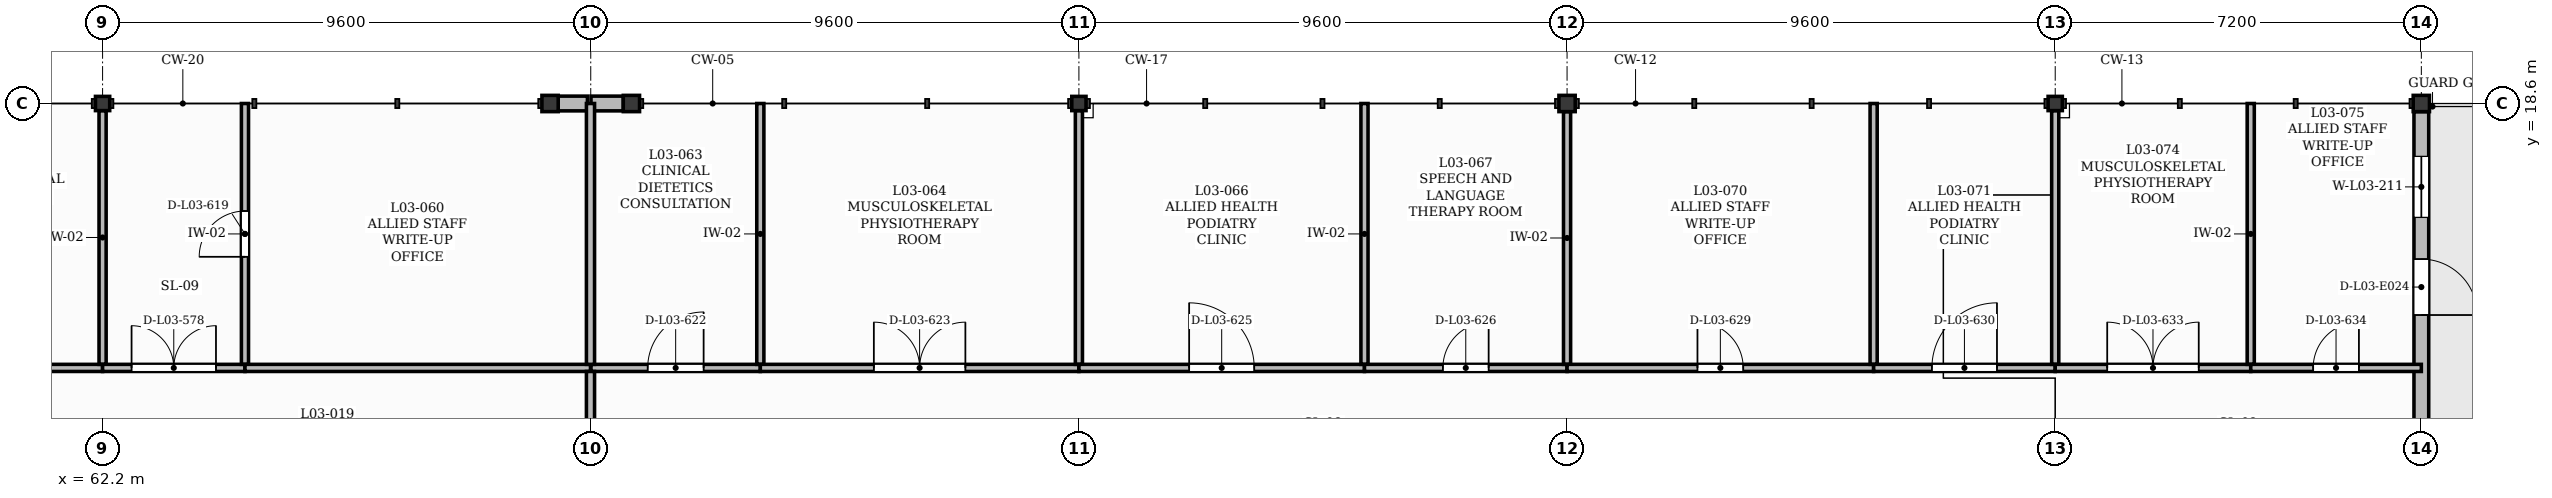
"""IFC4 building model, lengths in metres.
Left out: names, types, materials, properties, quantities, classifications, styles, units other than length and angle.
Written with IfcOpenShell. Run it as: python <this file> out.ifc"""

import sys

from ifc_helpers import new_model, si_unit, direction, frame, frame_2d, origin, origin_2d, place, context, subcontext, project, spatial, rectangle, extrude, element, fill, save


model = new_model("IFC4")
c1 = context("Model", 3, precision=1e-05, world=origin(), true_north=direction((0.0, 1.0)))
c2 = subcontext(c1, "Body", "Model", "MODEL_VIEW")
j1 = project(units=[si_unit("LENGTHUNIT", "METRE"), si_unit("PLANEANGLEUNIT", "RADIAN")], contexts=[c1])
p1 = place(None, origin())
s1 = spatial("IfcSite", under=j1, at=p1, CompositionType="ELEMENT")
p2 = place(p1, origin())
s2 = spatial("IfcBuilding", under=s1, at=p2, CompositionType="ELEMENT")
p3 = place(p2, frame((0.0, 0.0, 13.2)))
s3 = spatial("IfcBuildingStorey", under=s2, at=p3, CompositionType="ELEMENT", Elevation=13.2)
p4 = place(p3, frame((72.6, 18.6, 0.0), z_axis=(0.0, 0.0, 1.0), x_axis=(1.0, 0.0, 0.0)))
e1 = element("IfcColumn", 1, at=p4, inside=s3, PredefinedType="COLUMN", context=c2, shape_type="SweptSolid", body=[
    extrude(rectangle(XDim=0.32, YDim=0.32, at=origin_2d()), origin(), (0.0, 0.0, 1.0), 8.109),
])
p5 = place(p3, frame((81.4, 18.6, 0.0), z_axis=(0.0, 0.0, 1.0), x_axis=(1.0, 0.0, 0.0)))
e2 = element("IfcColumn", 2, at=p5, inside=s3, PredefinedType="COLUMN", context=c2, shape_type="SweptSolid", body=[
    extrude(rectangle(XDim=0.28, YDim=0.28, at=origin_2d()), origin(), (0.0, 0.0, 1.0), 8.109),
])
p6 = place(p3, frame((91.0, 18.6, 0.0), z_axis=(0.0, 0.0, 1.0), x_axis=(1.0, 0.0, 0.0)))
e3 = element("IfcColumn", 3, at=p6, inside=s3, PredefinedType="COLUMN", context=c2, shape_type="SweptSolid", body=[
    extrude(rectangle(XDim=0.32, YDim=0.32, at=origin_2d()), origin(), (0.0, 0.0, 1.0), 8.109),
])
p7 = place(p3, frame((100.6, 18.6, 0.0), z_axis=(0.0, 0.0, 1.0), x_axis=(1.0, 0.0, 0.0)))
e4 = element("IfcColumn", 4, at=p7, inside=s3, PredefinedType="COLUMN", context=c2, shape_type="SweptSolid", body=[
    extrude(rectangle(XDim=0.28, YDim=0.28, at=origin_2d()), origin(), (0.0, 0.0, 1.0), 8.109),
])
p8 = place(p3, frame((107.8, 18.6, 0.0), z_axis=(0.0, 0.0, 1.0), x_axis=(1.0, 0.0, 0.0)))
e5 = element("IfcColumn", 5, at=p8, inside=s3, PredefinedType="COLUMN", context=c2, shape_type="SweptSolid", body=[
    extrude(rectangle(XDim=0.32, YDim=0.32, at=origin_2d()), origin(), (0.0, 0.0, 1.0), 8.109),
])
p9 = place(p3, frame((62.2, 18.6, 0.0), z_axis=(0.0, 0.0, 1.0), x_axis=(1.0, 0.0, 0.0)))
e6 = element("IfcColumn", 6, at=p9, inside=s3, PredefinedType="COLUMN", context=c2, shape_type="SweptSolid", body=[
    extrude(rectangle(XDim=0.28, YDim=0.28, at=origin_2d()), origin(), (0.0, 0.0, 1.0), 8.109),
])
p10 = place(p3, frame((71.0, 18.6, 0.0), z_axis=(0.0, 0.0, 1.0), x_axis=(1.0, 0.0, 0.0)))
e7 = element("IfcColumn", 7, at=p10, inside=s3, PredefinedType="COLUMN", context=c2, shape_type="SweptSolid", body=[
    extrude(rectangle(XDim=0.32, YDim=0.32, at=origin_2d()), origin(), (0.0, 0.0, 1.0), 8.109),
])
p11 = place(p3, frame((71.16, 18.6, 0.0), z_axis=(0.0, 0.0, 1.0), x_axis=(1.0, 0.0, 0.0)))
e8 = element("IfcWall", 8, at=p11, inside=s3, PredefinedType="SOLIDWALL", context=c2, shape_type="SweptSolid", body=[
    extrude(rectangle(XDim=0.575, YDim=0.29, at=frame_2d((0.288, 0.0))), origin(), (0.0, 0.0, 1.0), 4.0),
])
p12 = place(p3, frame((71.805, 18.6, 0.0), z_axis=(0.0, 0.0, 1.0), x_axis=(1.0, 0.0, 0.0)))
e9 = element("IfcWall", 9, at=p12, inside=s3, PredefinedType="SOLIDWALL", context=c2, shape_type="SweptSolid", body=[
    extrude(rectangle(XDim=0.635, YDim=0.29, at=frame_2d((0.317, 0.0))), origin(), (0.0, 0.0, 1.0), 4.0),
])
p13 = place(p3, frame((107.8, 11.54, 0.0), z_axis=(0.0, 0.0, 1.0), x_axis=(0.0, 1.0, 0.0)))
e10 = element("IfcWall", 10, at=p13, inside=s3, PredefinedType="SOLIDWALL", context=c2, shape_type="SweptSolid", body=[
    extrude(rectangle(XDim=6.9, YDim=0.29, at=frame_2d((3.45, 0.0))), origin(), (0.0, 0.0, 1.0), 4.0),
])
p14 = place(p13, frame((2.9, 0.0, 0.0)))
e11 = element("IfcOpeningElement", 11, at=p14, cuts=e10, PredefinedType="OPENING", context=c2, shape_type="SweptSolid", body=[
    extrude(rectangle(XDim=1.1, YDim=2.25, at=frame_2d((0.55, 1.125))), frame((0.0, 0.155, 0.0), z_axis=(0.0, -1.0, 0.0), x_axis=(1.0, 0.0, 0.0)), (0.0, 0.0, 1.0), 0.31),
])
p15 = place(p13, frame((4.82, 0.0, 1.0)))
e12 = element("IfcOpeningElement", 12, at=p15, cuts=e10, PredefinedType="OPENING", context=c2, shape_type="SweptSolid", body=[
    extrude(rectangle(XDim=1.2, YDim=1.95, at=frame_2d((0.6, 0.975))), frame((0.0, 0.155, 0.0), z_axis=(0.0, -1.0, 0.0), x_axis=(1.0, 0.0, 0.0)), (0.0, 0.0, 1.0), 0.31),
])
p16 = place(p3, frame((57.866, 13.4, 0.0), z_axis=(0.0, 0.0, 1.0), x_axis=(1.0, 0.0, 0.0)))
e13 = element("IfcWall", 13, at=p16, inside=s3, PredefinedType="PARTITIONING", context=c2, shape_type="SweptSolid", body=[
    extrude(rectangle(XDim=4.334, YDim=0.14, at=frame_2d((2.167, 0.0))), origin(), (0.0, 0.0, 1.0), 3.75),
])
p17 = place(p16, frame((1.677, 0.0, 0.0)))
e14 = element("IfcOpeningElement", 14, at=p17, cuts=e13, PredefinedType="OPENING", context=c2, shape_type="SweptSolid", body=[
    extrude(rectangle(XDim=0.98, YDim=2.15, at=frame_2d((0.49, 1.075))), frame((0.0, 0.08, 0.0), z_axis=(0.0, -1.0, 0.0), x_axis=(1.0, 0.0, 0.0)), (0.0, 0.0, 1.0), 0.16),
])
p18 = place(p3, frame((62.2, 13.47, 0.0), z_axis=(0.0, 0.0, 1.0), x_axis=(0.0, 1.0, 0.0)))
e15 = element("IfcWall", 15, at=p18, inside=s3, PredefinedType="PARTITIONING", context=c2, shape_type="SweptSolid", body=[
    extrude(rectangle(XDim=4.99, YDim=0.14, at=frame_2d((2.495, 0.0))), origin(), (0.0, 0.0, 1.0), 3.75),
])
p19 = place(p3, frame((62.2, 13.4, 0.0), z_axis=(0.0, 0.0, 1.0), x_axis=(1.0, 0.0, 0.0)))
e16 = element("IfcWall", 16, at=p19, inside=s3, PredefinedType="PARTITIONING", context=c2, shape_type="SweptSolid", body=[
    extrude(rectangle(XDim=2.8, YDim=0.14, at=frame_2d((1.4, 0.0))), origin(), (0.0, 0.0, 1.0), 3.75),
])
p20 = place(p19, frame((0.57, 0.0, 0.0)))
e17 = element("IfcOpeningElement", 17, at=p20, cuts=e16, PredefinedType="OPENING", context=c2, shape_type="SweptSolid", body=[
    extrude(rectangle(XDim=1.66, YDim=2.3, at=frame_2d((0.83, 1.15))), frame((0.0, 0.08, 0.0), z_axis=(0.0, -1.0, 0.0), x_axis=(1.0, 0.0, 0.0)), (0.0, 0.0, 1.0), 0.16),
])
p21 = place(p3, frame((65.0, 13.47, 0.0), z_axis=(0.0, 0.0, 1.0), x_axis=(0.0, 1.0, 0.0)))
e18 = element("IfcWall", 18, at=p21, inside=s3, PredefinedType="PARTITIONING", context=c2, shape_type="SweptSolid", body=[
    extrude(rectangle(XDim=5.13, YDim=0.14, at=frame_2d((2.565, 0.0))), origin(), (0.0, 0.0, 1.0), 3.75),
])
p22 = place(p21, frame((2.115, 0.0, 0.0)))
e19 = element("IfcOpeningElement", 19, at=p22, cuts=e18, PredefinedType="OPENING", context=c2, shape_type="SweptSolid", body=[
    extrude(rectangle(XDim=0.9, YDim=2.1, at=frame_2d((0.45, 1.05))), frame((0.0, 0.08, 0.0), z_axis=(0.0, -1.0, 0.0), x_axis=(1.0, 0.0, 0.0)), (0.0, 0.0, 1.0), 0.16),
])
p23 = place(p3, frame((65.0, 13.4, 0.0), z_axis=(0.0, 0.0, 1.0), x_axis=(1.0, 0.0, 0.0)))
e20 = element("IfcWall", 20, at=p23, inside=s3, PredefinedType="PARTITIONING", context=c2, shape_type="SweptSolid", body=[
    extrude(rectangle(XDim=6.795, YDim=0.14, at=frame_2d((3.397, 0.0))), origin(), (0.0, 0.0, 1.0), 3.75),
])
p24 = place(p3, frame((71.805, 13.4, 0.0), z_axis=(0.0, 0.0, 1.0), x_axis=(1.0, 0.0, 0.0)))
e21 = element("IfcWall", 21, at=p24, inside=s3, PredefinedType="PARTITIONING", context=c2, shape_type="SweptSolid", body=[
    extrude(rectangle(XDim=3.33, YDim=0.14, at=frame_2d((1.665, 0.0))), origin(), (0.0, 0.0, 1.0), 3.75),
])
p25 = place(p24, frame((1.115, 0.0, 0.0)))
e22 = element("IfcOpeningElement", 22, at=p25, cuts=e21, PredefinedType="OPENING", context=c2, shape_type="SweptSolid", body=[
    extrude(rectangle(XDim=1.1, YDim=2.1, at=frame_2d((0.55, 1.05))), frame((0.0, 0.08, 0.0), z_axis=(0.0, -1.0, 0.0), x_axis=(1.0, 0.0, 0.0)), (0.0, 0.0, 1.0), 0.16),
])
p26 = place(p3, frame((75.135, 13.47, 0.0), z_axis=(0.0, 0.0, 1.0), x_axis=(0.0, 1.0, 0.0)))
e23 = element("IfcWall", 23, at=p26, inside=s3, PredefinedType="PARTITIONING", context=c2, shape_type="SweptSolid", body=[
    extrude(rectangle(XDim=5.13, YDim=0.14, at=frame_2d((2.565, 0.0))), origin(), (0.0, 0.0, 1.0), 3.75),
])
p27 = place(p3, frame((75.135, 13.4, 0.0), z_axis=(0.0, 0.0, 1.0), x_axis=(1.0, 0.0, 0.0)))
e24 = element("IfcWall", 24, at=p27, inside=s3, PredefinedType="PARTITIONING", context=c2, shape_type="SweptSolid", body=[
    extrude(rectangle(XDim=6.265, YDim=0.14, at=frame_2d((3.132, 0.0))), origin(), (0.0, 0.0, 1.0), 3.75),
])
p28 = place(p27, frame((2.232, 0.0, 0.0)))
e25 = element("IfcOpeningElement", 25, at=p28, cuts=e24, PredefinedType="OPENING", context=c2, shape_type="SweptSolid", body=[
    extrude(rectangle(XDim=1.8, YDim=2.3, at=frame_2d((0.9, 1.15))), frame((0.0, 0.08, 0.0), z_axis=(0.0, -1.0, 0.0), x_axis=(1.0, 0.0, 0.0)), (0.0, 0.0, 1.0), 0.16),
])
p29 = place(p3, frame((81.4, 13.47, 0.0), z_axis=(0.0, 0.0, 1.0), x_axis=(0.0, 1.0, 0.0)))
e26 = element("IfcWall", 26, at=p29, inside=s3, PredefinedType="PARTITIONING", context=c2, shape_type="SweptSolid", body=[
    extrude(rectangle(XDim=4.99, YDim=0.14, at=frame_2d((2.495, 0.0))), origin(), (0.0, 0.0, 1.0), 3.75),
])
p30 = place(p3, frame((81.4, 13.4, 0.0), z_axis=(0.0, 0.0, 1.0), x_axis=(1.0, 0.0, 0.0)))
e27 = element("IfcWall", 27, at=p30, inside=s3, PredefinedType="PARTITIONING", context=c2, shape_type="SweptSolid", body=[
    extrude(rectangle(XDim=5.616, YDim=0.14, at=frame_2d((2.808, 0.0))), origin(), (0.0, 0.0, 1.0), 3.75),
])
p31 = place(p30, frame((2.168, 0.0, 0.0)))
e28 = element("IfcOpeningElement", 28, at=p31, cuts=e27, PredefinedType="OPENING", context=c2, shape_type="SweptSolid", body=[
    extrude(rectangle(XDim=1.28, YDim=2.2, at=frame_2d((0.64, 1.1))), frame((0.0, 0.08, 0.0), z_axis=(0.0, -1.0, 0.0), x_axis=(1.0, 0.0, 0.0)), (0.0, 0.0, 1.0), 0.16),
])
p32 = place(p3, frame((87.016, 13.47, 0.0), z_axis=(0.0, 0.0, 1.0), x_axis=(0.0, 1.0, 0.0)))
e29 = element("IfcWall", 29, at=p32, inside=s3, PredefinedType="PARTITIONING", context=c2, shape_type="SweptSolid", body=[
    extrude(rectangle(XDim=5.13, YDim=0.14, at=frame_2d((2.565, 0.0))), origin(), (0.0, 0.0, 1.0), 3.75),
])
p33 = place(p3, frame((87.016, 13.4, 0.0), z_axis=(0.0, 0.0, 1.0), x_axis=(1.0, 0.0, 0.0)))
e30 = element("IfcWall", 30, at=p33, inside=s3, PredefinedType="PARTITIONING", context=c2, shape_type="SweptSolid", body=[
    extrude(rectangle(XDim=3.984, YDim=0.14, at=frame_2d((1.992, 0.0))), origin(), (0.0, 0.0, 1.0), 3.75),
])
p34 = place(p33, frame((1.542, 0.0, 0.0)))
e31 = element("IfcOpeningElement", 31, at=p34, cuts=e30, PredefinedType="OPENING", context=c2, shape_type="SweptSolid", body=[
    extrude(rectangle(XDim=0.9, YDim=2.1, at=frame_2d((0.45, 1.05))), frame((0.0, 0.08, 0.0), z_axis=(0.0, -1.0, 0.0), x_axis=(1.0, 0.0, 0.0)), (0.0, 0.0, 1.0), 0.16),
])
p35 = place(p3, frame((91.0, 13.47, 0.0), z_axis=(0.0, 0.0, 1.0), x_axis=(0.0, 1.0, 0.0)))
e32 = element("IfcWall", 32, at=p35, inside=s3, PredefinedType="PARTITIONING", context=c2, shape_type="SweptSolid", body=[
    extrude(rectangle(XDim=4.97, YDim=0.14, at=frame_2d((2.485, 0.0))), origin(), (0.0, 0.0, 1.0), 3.75),
])
p36 = place(p3, frame((91.0, 13.4, 0.0), z_axis=(0.0, 0.0, 1.0), x_axis=(1.0, 0.0, 0.0)))
e33 = element("IfcWall", 33, at=p36, inside=s3, PredefinedType="PARTITIONING", context=c2, shape_type="SweptSolid", body=[
    extrude(rectangle(XDim=6.029, YDim=0.14, at=frame_2d((3.015, 0.0))), origin(), (0.0, 0.0, 1.0), 3.75),
])
p37 = place(p36, frame((2.564, 0.0, 0.0)))
e34 = element("IfcOpeningElement", 34, at=p37, cuts=e33, PredefinedType="OPENING", context=c2, shape_type="SweptSolid", body=[
    extrude(rectangle(XDim=0.9, YDim=2.1, at=frame_2d((0.45, 1.05))), frame((0.0, 0.08, 0.0), z_axis=(0.0, -1.0, 0.0), x_axis=(1.0, 0.0, 0.0)), (0.0, 0.0, 1.0), 0.16),
])
p38 = place(p3, frame((97.029, 13.47, 0.0), z_axis=(0.0, 0.0, 1.0), x_axis=(0.0, 1.0, 0.0)))
e35 = element("IfcWall", 35, at=p38, inside=s3, PredefinedType="PARTITIONING", context=c2, shape_type="SweptSolid", body=[
    extrude(rectangle(XDim=5.13, YDim=0.14, at=frame_2d((2.565, 0.0))), origin(), (0.0, 0.0, 1.0), 3.75),
])
p39 = place(p3, frame((97.029, 13.4, 0.0), z_axis=(0.0, 0.0, 1.0), x_axis=(1.0, 0.0, 0.0)))
e36 = element("IfcWall", 36, at=p39, inside=s3, PredefinedType="PARTITIONING", context=c2, shape_type="SweptSolid", body=[
    extrude(rectangle(XDim=3.571, YDim=0.14, at=frame_2d((1.786, 0.0))), origin(), (0.0, 0.0, 1.0), 3.75),
])
p40 = place(p39, frame((1.146, 0.0, 0.0)))
e37 = element("IfcOpeningElement", 37, at=p40, cuts=e36, PredefinedType="OPENING", context=c2, shape_type="SweptSolid", body=[
    extrude(rectangle(XDim=1.28, YDim=2.2, at=frame_2d((0.64, 1.1))), frame((0.0, 0.08, 0.0), z_axis=(0.0, -1.0, 0.0), x_axis=(1.0, 0.0, 0.0)), (0.0, 0.0, 1.0), 0.16),
])
p41 = place(p3, frame((100.6, 13.47, 0.0), z_axis=(0.0, 0.0, 1.0), x_axis=(0.0, 1.0, 0.0)))
e38 = element("IfcWall", 38, at=p41, inside=s3, PredefinedType="PARTITIONING", context=c2, shape_type="SweptSolid", body=[
    extrude(rectangle(XDim=4.99, YDim=0.14, at=frame_2d((2.495, 0.0))), origin(), (0.0, 0.0, 1.0), 3.75),
])
p42 = place(p3, frame((100.6, 13.4, 0.0), z_axis=(0.0, 0.0, 1.0), x_axis=(1.0, 0.0, 0.0)))
e39 = element("IfcWall", 39, at=p42, inside=s3, PredefinedType="PARTITIONING", context=c2, shape_type="SweptSolid", body=[
    extrude(rectangle(XDim=3.845, YDim=0.14, at=frame_2d((1.922, 0.0))), origin(), (0.0, 0.0, 1.0), 3.75),
])
p43 = place(p42, frame((1.022, 0.0, 0.0)))
e40 = element("IfcOpeningElement", 40, at=p43, cuts=e39, PredefinedType="OPENING", context=c2, shape_type="SweptSolid", body=[
    extrude(rectangle(XDim=1.8, YDim=2.3, at=frame_2d((0.9, 1.15))), frame((0.0, 0.08, 0.0), z_axis=(0.0, -1.0, 0.0), x_axis=(1.0, 0.0, 0.0)), (0.0, 0.0, 1.0), 0.16),
])
p44 = place(p3, frame((104.445, 13.47, 0.0), z_axis=(0.0, 0.0, 1.0), x_axis=(0.0, 1.0, 0.0)))
e41 = element("IfcWall", 41, at=p44, inside=s3, PredefinedType="PARTITIONING", context=c2, shape_type="SweptSolid", body=[
    extrude(rectangle(XDim=5.13, YDim=0.14, at=frame_2d((2.565, 0.0))), origin(), (0.0, 0.0, 1.0), 3.75),
])
p45 = place(p3, frame((104.445, 13.4, 0.0), z_axis=(0.0, 0.0, 1.0), x_axis=(1.0, 0.0, 0.0)))
e42 = element("IfcWall", 42, at=p45, inside=s3, PredefinedType="PARTITIONING", context=c2, shape_type="SweptSolid", body=[
    extrude(rectangle(XDim=3.355, YDim=0.14, at=frame_2d((1.677, 0.0))), origin(), (0.0, 0.0, 1.0), 3.75),
])
p46 = place(p45, frame((1.228, 0.0, 0.0)))
e43 = element("IfcOpeningElement", 43, at=p46, cuts=e42, PredefinedType="OPENING", context=c2, shape_type="SweptSolid", body=[
    extrude(rectangle(XDim=0.9, YDim=2.1, at=frame_2d((0.45, 1.05))), frame((0.0, 0.08, 0.0), z_axis=(0.0, -1.0, 0.0), x_axis=(1.0, 0.0, 0.0)), (0.0, 0.0, 1.0), 0.16),
])
p47 = place(p3, frame((71.795, 10.87, 0.0), z_axis=(0.0, 0.0, 1.0), x_axis=(0.0, 1.0, 0.0)))
e44 = element("IfcWall", 44, at=p47, inside=s3, PredefinedType="PARTITIONING", context=c2, shape_type="SweptSolid", body=[
    extrude(rectangle(XDim=2.46, YDim=0.16, at=frame_2d((1.23, 0.0))), origin(), (0.0, 0.0, 1.0), 3.75),
])
p48 = place(p3, frame((71.795, 13.47, 0.0), z_axis=(0.0, 0.0, 1.0), x_axis=(0.0, 1.0, 0.0)))
e45 = element("IfcWall", 45, at=p48, inside=s3, PredefinedType="PARTITIONING", context=c2, shape_type="SweptSolid", body=[
    extrude(rectangle(XDim=5.13, YDim=0.16, at=frame_2d((2.565, 0.0))), origin(), (0.0, 0.0, 1.0), 3.75),
])
p49 = place(p14, frame((1.1, 0.0, 0.0), z_axis=(0.0, 0.0, 1.0), x_axis=(-1.0, 0.0, 0.0)))
e46 = element("IfcDoor", 46, at=p49, inside=s3, OperationType="SINGLE_SWING_RIGHT", PredefinedType="DOOR", context=c2, shape_type="SweptSolid", body=[
    extrude(rectangle(XDim=1.1, YDim=2.25, at=frame_2d((0.55, 1.125))), frame((0.0, 0.025, 0.0), z_axis=(0.0, -1.0, 0.0), x_axis=(1.0, 0.0, 0.0)), (0.0, 0.0, 1.0), 0.05),
])
fill(e11, e46)
p50 = place(p15, origin())
e47 = element("IfcWindow", 47, at=p50, inside=s3, PartitioningType="SINGLE_PANEL", PredefinedType="WINDOW", context=c2, shape_type="SweptSolid", body=[
    extrude(rectangle(XDim=1.2, YDim=1.95, at=frame_2d((0.6, 0.975))), frame((0.0, 0.03, 0.0), z_axis=(0.0, -1.0, 0.0), x_axis=(1.0, 0.0, 0.0)), (0.0, 0.0, 1.0), 0.06),
])
fill(e12, e47)
p51 = place(p20, origin())
e48 = element("IfcDoor", 48, at=p51, inside=s3, OperationType="DOUBLE_DOOR_SINGLE_SWING", PredefinedType="DOOR", context=c2, shape_type="SweptSolid", body=[
    extrude(rectangle(XDim=1.66, YDim=2.3, at=frame_2d((0.83, 1.15))), frame((0.0, 0.025, 0.0), z_axis=(0.0, -1.0, 0.0), x_axis=(1.0, 0.0, 0.0)), (0.0, 0.0, 1.0), 0.05),
])
fill(e17, e48)
p52 = place(p22, origin())
e49 = element("IfcDoor", 49, at=p52, inside=s3, OperationType="SINGLE_SWING_LEFT", PredefinedType="DOOR", context=c2, shape_type="SweptSolid", body=[
    extrude(rectangle(XDim=0.9, YDim=2.1, at=frame_2d((0.45, 1.05))), frame((0.0, 0.025, 0.0), z_axis=(0.0, -1.0, 0.0), x_axis=(1.0, 0.0, 0.0)), (0.0, 0.0, 1.0), 0.05),
])
fill(e19, e49)
p53 = place(p25, origin())
e50 = element("IfcDoor", 50, at=p53, inside=s3, OperationType="SINGLE_SWING_RIGHT", PredefinedType="DOOR", context=c2, shape_type="SweptSolid", body=[
    extrude(rectangle(XDim=1.1, YDim=2.1, at=frame_2d((0.55, 1.05))), frame((0.0, 0.025, 0.0), z_axis=(0.0, -1.0, 0.0), x_axis=(1.0, 0.0, 0.0)), (0.0, 0.0, 1.0), 0.05),
])
fill(e22, e50)
p54 = place(p28, origin())
e51 = element("IfcDoor", 51, at=p54, inside=s3, OperationType="DOUBLE_DOOR_SINGLE_SWING", PredefinedType="DOOR", context=c2, shape_type="SweptSolid", body=[
    extrude(rectangle(XDim=1.8, YDim=2.3, at=frame_2d((0.9, 1.15))), frame((0.0, 0.025, 0.0), z_axis=(0.0, -1.0, 0.0), x_axis=(1.0, 0.0, 0.0)), (0.0, 0.0, 1.0), 0.05),
])
fill(e25, e51)
p55 = place(p31, origin())
e52 = element("IfcDoor", 52, at=p55, inside=s3, OperationType="SINGLE_SWING_LEFT", PredefinedType="DOOR", context=c2, shape_type="SweptSolid", body=[
    extrude(rectangle(XDim=1.28, YDim=2.2, at=frame_2d((0.64, 1.1))), frame((0.0, 0.025, 0.0), z_axis=(0.0, -1.0, 0.0), x_axis=(1.0, 0.0, 0.0)), (0.0, 0.0, 1.0), 0.05),
])
fill(e28, e52)
p56 = place(p34, origin())
e53 = element("IfcDoor", 53, at=p56, inside=s3, OperationType="SINGLE_SWING_RIGHT", PredefinedType="DOOR", context=c2, shape_type="SweptSolid", body=[
    extrude(rectangle(XDim=0.9, YDim=2.1, at=frame_2d((0.45, 1.05))), frame((0.0, 0.025, 0.0), z_axis=(0.0, -1.0, 0.0), x_axis=(1.0, 0.0, 0.0)), (0.0, 0.0, 1.0), 0.05),
])
fill(e31, e53)
p57 = place(p37, origin())
e54 = element("IfcDoor", 54, at=p57, inside=s3, OperationType="SINGLE_SWING_LEFT", PredefinedType="DOOR", context=c2, shape_type="SweptSolid", body=[
    extrude(rectangle(XDim=0.9, YDim=2.1, at=frame_2d((0.45, 1.05))), frame((0.0, 0.025, 0.0), z_axis=(0.0, -1.0, 0.0), x_axis=(1.0, 0.0, 0.0)), (0.0, 0.0, 1.0), 0.05),
])
fill(e34, e54)
p58 = place(p40, origin())
e55 = element("IfcDoor", 55, at=p58, inside=s3, OperationType="SINGLE_SWING_RIGHT", PredefinedType="DOOR", context=c2, shape_type="SweptSolid", body=[
    extrude(rectangle(XDim=1.28, YDim=2.2, at=frame_2d((0.64, 1.1))), frame((0.0, 0.025, 0.0), z_axis=(0.0, -1.0, 0.0), x_axis=(1.0, 0.0, 0.0)), (0.0, 0.0, 1.0), 0.05),
])
fill(e37, e55)
p59 = place(p43, origin())
e56 = element("IfcDoor", 56, at=p59, inside=s3, OperationType="DOUBLE_DOOR_SINGLE_SWING", PredefinedType="DOOR", context=c2, shape_type="SweptSolid", body=[
    extrude(rectangle(XDim=1.8, YDim=2.3, at=frame_2d((0.9, 1.15))), frame((0.0, 0.025, 0.0), z_axis=(0.0, -1.0, 0.0), x_axis=(1.0, 0.0, 0.0)), (0.0, 0.0, 1.0), 0.05),
])
fill(e40, e56)
p60 = place(p46, origin())
e57 = element("IfcDoor", 57, at=p60, inside=s3, OperationType="SINGLE_SWING_RIGHT", PredefinedType="DOOR", context=c2, shape_type="SweptSolid", body=[
    extrude(rectangle(XDim=0.9, YDim=2.1, at=frame_2d((0.45, 1.05))), frame((0.0, 0.025, 0.0), z_axis=(0.0, -1.0, 0.0), x_axis=(1.0, 0.0, 0.0)), (0.0, 0.0, 1.0), 0.05),
])
fill(e43, e57)
save(model, sys.argv[1])
